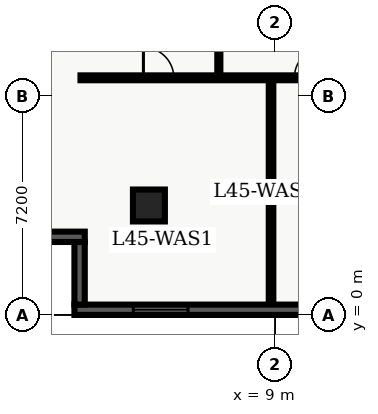
"""IFC4 building model, lengths in metres.
Left out: names, types, materials, properties, quantities, classifications, styles, units other than length and angle.
Written with IfcOpenShell. Run it as: python <this file> out.ifc"""

import sys

from ifc_helpers import new_model, entity, si_unit, converted_unit, direction, frame, origin_with_axes, origin_2d_with_axis, place, context, subcontext, project, spatial, polyline, rectangle, outline, extrude, element, fill, save


model = new_model("IFC4")
c1 = context("Model", 3, precision=1e-05, world=origin_with_axes(), true_north=direction((0.0, 1.0)))
c2 = subcontext(c1, "Body", "Model", "MODEL_VIEW")
j1 = project(units=[si_unit("LENGTHUNIT", "METRE"), converted_unit("PLANEANGLEUNIT", "DEGREE", entity("IfcPlaneAngleMeasure", 0.017), si_unit("PLANEANGLEUNIT", "RADIAN"), dimensions=[0, 0, 0, 0, 0, 0, 0])], contexts=[c1])
p1 = place(None, origin_with_axes())
s1 = spatial("IfcSite", under=j1, at=p1, CompositionType="ELEMENT")
p2 = place(p1, origin_with_axes())
s2 = spatial("IfcBuilding", under=s1, at=p2, CompositionType="ELEMENT")
p3 = place(p2, frame((0.0, 0.0, 183.6), z_axis=(0.0, 0.0, 1.0), x_axis=(1.0, 0.0, 0.0)))
s3 = spatial("IfcBuildingStorey", under=s2, at=p3, CompositionType="ELEMENT", Elevation=183.6)
p4 = place(p3, frame((4.85, 3.6, 0.0), z_axis=(0.0, 0.0, 1.0), x_axis=(1.0, 0.0, 0.0)))
e1 = element("IfcColumn", 1, at=p4, inside=s3, PredefinedType="COLUMN", context=c2, shape_type="SweptSolid", body=[
    extrude(rectangle(XDim=1.05, YDim=1.05, at=origin_2d_with_axis()), origin_with_axes(), (0.0, 0.0, 1.0), 3.9),
])
p5 = place(p3, frame((2.6, 7.8, 0.0), z_axis=(0.0, 0.0, 1.0), x_axis=(1.0, 0.0, 0.0)))
e2 = element("IfcWall", 2, at=p5, inside=s3, PredefinedType="PARTITIONING", context=c2, shape_type="SweptSolid", body=[
    extrude(outline(polyline([(0.0, -0.08), (18.55, -0.08), (18.55, 0.08), (0.0, 0.08), (0.0, -0.08)])), origin_with_axes(), (0.0, 0.0, 1.0), 2.64),
])
p6 = place(p5, frame((2.569, 0.0, 0.0), z_axis=(0.0, 0.0, 1.0), x_axis=(1.0, 0.0, 0.0)))
e3 = element("IfcOpeningElement", 3, at=p6, cuts=e2, PredefinedType="OPENING", context=c2, shape_type="SweptSolid", body=[
    extrude(rectangle(XDim=1.0, YDim=0.18, at=origin_2d_with_axis()), origin_with_axes(), (0.0, 0.0, 1.0), 2.15),
])
p7 = place(p5, frame((7.534, 0.0, 0.0), z_axis=(0.0, 0.0, 1.0), x_axis=(1.0, 0.0, 0.0)))
e4 = element("IfcOpeningElement", 4, at=p7, cuts=e2, PredefinedType="OPENING", context=c2, shape_type="SweptSolid", body=[
    extrude(rectangle(XDim=1.0, YDim=0.18, at=origin_2d_with_axis()), origin_with_axes(), (0.0, 0.0, 1.0), 2.15),
])
p8 = place(p5, frame((11.293, 0.0, 0.0), z_axis=(0.0, 0.0, 1.0), x_axis=(1.0, 0.0, 0.0)))
e5 = element("IfcOpeningElement", 5, at=p8, cuts=e2, PredefinedType="OPENING", context=c2, shape_type="SweptSolid", body=[
    extrude(rectangle(XDim=1.0, YDim=0.18, at=origin_2d_with_axis()), origin_with_axes(), (0.0, 0.0, 1.0), 2.15),
])
p9 = place(p5, frame((16.142, 0.0, 0.0), z_axis=(0.0, 0.0, 1.0), x_axis=(1.0, 0.0, 0.0)))
e6 = element("IfcOpeningElement", 6, at=p9, cuts=e2, PredefinedType="OPENING", context=c2, shape_type="SweptSolid", body=[
    extrude(rectangle(XDim=1.0, YDim=0.18, at=origin_2d_with_axis()), origin_with_axes(), (0.0, 0.0, 1.0), 2.15),
])
p10 = place(p3, frame((7.15, 7.8, 0.0), z_axis=(0.0, 0.0, 1.0), x_axis=(0.0, 1.0, 0.0)))
e7 = element("IfcWall", 7, at=p10, inside=s3, PredefinedType="PARTITIONING", context=c2, shape_type="SweptSolid", body=[
    extrude(outline(polyline([(0.0, -0.05), (32.7, -0.05), (32.7, 0.05), (0.0, 0.05), (0.0, -0.05)])), origin_with_axes(), (0.0, 0.0, 1.0), 2.64),
])
p11 = place(p10, frame((7.092, 0.0, 0.0), z_axis=(0.0, 0.0, 1.0), x_axis=(1.0, 0.0, 0.0)))
e8 = element("IfcOpeningElement", 8, at=p11, cuts=e7, PredefinedType="OPENING", context=c2, shape_type="SweptSolid", body=[
    extrude(rectangle(XDim=1.0, YDim=0.12, at=origin_2d_with_axis()), origin_with_axes(), (0.0, 0.0, 1.0), 2.15),
])
p12 = place(p10, frame((23.312, 0.0, 0.0), z_axis=(0.0, 0.0, 1.0), x_axis=(1.0, 0.0, 0.0)))
e9 = element("IfcOpeningElement", 9, at=p12, cuts=e7, PredefinedType="OPENING", context=c2, shape_type="SweptSolid", body=[
    extrude(rectangle(XDim=1.0, YDim=0.12, at=origin_2d_with_axis()), origin_with_axes(), (0.0, 0.0, 1.0), 2.15),
])
p13 = place(p3, frame((8.867, 0.335, 0.0), z_axis=(0.0, 0.0, 1.0), x_axis=(0.0, 1.0, 0.0)))
e10 = element("IfcWall", 10, at=p13, inside=s3, PredefinedType="PARTITIONING", context=c2, shape_type="SweptSolid", body=[
    extrude(outline(polyline([(0.0, -0.075), (7.365, -0.075), (7.365, 0.075), (0.0, 0.075), (0.0, -0.075)])), origin_with_axes(), (0.0, 0.0, 1.0), 2.64),
])
p14 = place(p3, frame((57.26, 0.17, 0.0), z_axis=(0.0, 0.0, 1.0), x_axis=(-1.0, 0.0, 0.0)))
e11 = element("IfcWall", 11, at=p14, inside=s3, PredefinedType="SOLIDWALL", context=c2, shape_type="SweptSolid", body=[
    extrude(outline(polyline([(0.0, -0.17), (54.86, -0.17), (54.86, 0.17), (0.0, 0.17), (0.0, -0.17)])), origin_with_axes(), (0.0, 0.0, 1.0), 3.6),
])
p15 = place(p14, frame((2.836, 0.0, 0.45), z_axis=(0.0, 0.0, 1.0), x_axis=(1.0, 0.0, 0.0)))
e12 = element("IfcOpeningElement", 12, at=p15, cuts=e11, PredefinedType="OPENING", context=c2, shape_type="SweptSolid", body=[
    extrude(rectangle(XDim=1.8, YDim=0.36, at=origin_2d_with_axis()), origin_with_axes(), (0.0, 0.0, 1.0), 2.1),
])
p16 = place(p14, frame((7.307, 0.0, 0.45), z_axis=(0.0, 0.0, 1.0), x_axis=(1.0, 0.0, 0.0)))
e13 = element("IfcOpeningElement", 13, at=p16, cuts=e11, PredefinedType="OPENING", context=c2, shape_type="SweptSolid", body=[
    extrude(rectangle(XDim=1.8, YDim=0.36, at=origin_2d_with_axis()), origin_with_axes(), (0.0, 0.0, 1.0), 2.1),
])
p17 = place(p14, frame((11.779, 0.0, 0.45), z_axis=(0.0, 0.0, 1.0), x_axis=(1.0, 0.0, 0.0)))
e14 = element("IfcOpeningElement", 14, at=p17, cuts=e11, PredefinedType="OPENING", context=c2, shape_type="SweptSolid", body=[
    extrude(rectangle(XDim=1.8, YDim=0.36, at=origin_2d_with_axis()), origin_with_axes(), (0.0, 0.0, 1.0), 2.1),
])
p18 = place(p14, frame((16.251, 0.0, 0.45), z_axis=(0.0, 0.0, 1.0), x_axis=(1.0, 0.0, 0.0)))
e15 = element("IfcOpeningElement", 15, at=p18, cuts=e11, PredefinedType="OPENING", context=c2, shape_type="SweptSolid", body=[
    extrude(rectangle(XDim=1.8, YDim=0.36, at=origin_2d_with_axis()), origin_with_axes(), (0.0, 0.0, 1.0), 2.1),
])
p19 = place(p14, frame((20.723, 0.0, 0.45), z_axis=(0.0, 0.0, 1.0), x_axis=(1.0, 0.0, 0.0)))
e16 = element("IfcOpeningElement", 16, at=p19, cuts=e11, PredefinedType="OPENING", context=c2, shape_type="SweptSolid", body=[
    extrude(rectangle(XDim=1.8, YDim=0.36, at=origin_2d_with_axis()), origin_with_axes(), (0.0, 0.0, 1.0), 2.1),
])
p20 = place(p14, frame((25.644, 0.0, 0.45), z_axis=(0.0, 0.0, 1.0), x_axis=(1.0, 0.0, 0.0)))
e17 = element("IfcOpeningElement", 17, at=p20, cuts=e11, PredefinedType="OPENING", context=c2, shape_type="SweptSolid", body=[
    extrude(rectangle(XDim=1.8, YDim=0.36, at=origin_2d_with_axis()), origin_with_axes(), (0.0, 0.0, 1.0), 2.1),
])
p21 = place(p14, frame((34.138, 0.0, 0.45), z_axis=(0.0, 0.0, 1.0), x_axis=(1.0, 0.0, 0.0)))
e18 = element("IfcOpeningElement", 18, at=p21, cuts=e11, PredefinedType="OPENING", context=c2, shape_type="SweptSolid", body=[
    extrude(rectangle(XDim=1.8, YDim=0.36, at=origin_2d_with_axis()), origin_with_axes(), (0.0, 0.0, 1.0), 2.1),
])
p22 = place(p14, frame((38.609, 0.0, 0.45), z_axis=(0.0, 0.0, 1.0), x_axis=(1.0, 0.0, 0.0)))
e19 = element("IfcOpeningElement", 19, at=p22, cuts=e11, PredefinedType="OPENING", context=c2, shape_type="SweptSolid", body=[
    extrude(rectangle(XDim=1.8, YDim=0.36, at=origin_2d_with_axis()), origin_with_axes(), (0.0, 0.0, 1.0), 2.1),
])
p23 = place(p14, frame((43.081, 0.0, 0.45), z_axis=(0.0, 0.0, 1.0), x_axis=(1.0, 0.0, 0.0)))
e20 = element("IfcOpeningElement", 20, at=p23, cuts=e11, PredefinedType="OPENING", context=c2, shape_type="SweptSolid", body=[
    extrude(rectangle(XDim=1.8, YDim=0.36, at=origin_2d_with_axis()), origin_with_axes(), (0.0, 0.0, 1.0), 2.1),
])
p24 = place(p14, frame((52.024, 0.0, 0.45), z_axis=(0.0, 0.0, 1.0), x_axis=(1.0, 0.0, 0.0)))
e21 = element("IfcOpeningElement", 21, at=p24, cuts=e11, PredefinedType="OPENING", context=c2, shape_type="SweptSolid", body=[
    extrude(rectangle(XDim=1.8, YDim=0.36, at=origin_2d_with_axis()), origin_with_axes(), (0.0, 0.0, 1.0), 2.1),
])
p25 = place(p3, frame((2.57, 0.34, 0.0), z_axis=(0.0, 0.0, 1.0), x_axis=(0.0, 1.0, 0.0)))
e22 = element("IfcWall", 22, at=p25, inside=s3, PredefinedType="SOLIDWALL", context=c2, shape_type="SweptSolid", body=[
    extrude(outline(polyline([(0.0, -0.17), (2.06, -0.17), (2.06, 0.17), (0.0, 0.17), (0.0, -0.17)])), origin_with_axes(), (0.0, 0.0, 1.0), 3.6),
])
p26 = place(p3, frame((2.74, 2.57, 0.0), z_axis=(0.0, 0.0, 1.0), x_axis=(-1.0, 0.0, 0.0)))
e23 = element("IfcWall", 23, at=p26, inside=s3, PredefinedType="SOLIDWALL", context=c2, shape_type="SweptSolid", body=[
    extrude(outline(polyline([(0.0, -0.17), (2.74, -0.17), (2.74, 0.17), (0.0, 0.17), (0.0, -0.17)])), origin_with_axes(), (0.0, 0.0, 1.0), 3.6),
])
p27 = place(p5, frame((2.569, 0.0, 0.0), z_axis=(0.0, 0.0, 1.0), x_axis=(1.0, 0.0, 0.0)))
e24 = element("IfcDoor", 24, at=p27, inside=s3, OperationType="SINGLE_SWING_LEFT", PredefinedType="DOOR", context=c2, shape_type="SweptSolid", body=[
    extrude(rectangle(XDim=1.0, YDim=0.09, at=origin_2d_with_axis()), origin_with_axes(), (0.0, 0.0, 1.0), 2.15),
])
fill(e3, e24)
p28 = place(p5, frame((7.534, 0.0, 0.0), z_axis=(0.0, 0.0, 1.0), x_axis=(1.0, 0.0, 0.0)))
e25 = element("IfcDoor", 25, at=p28, inside=s3, OperationType="SINGLE_SWING_RIGHT", PredefinedType="DOOR", context=c2, shape_type="SweptSolid", body=[
    extrude(rectangle(XDim=1.0, YDim=0.09, at=origin_2d_with_axis()), origin_with_axes(), (0.0, 0.0, 1.0), 2.15),
])
fill(e4, e25)
p29 = place(p14, frame((52.024, 0.0, 0.45), z_axis=(0.0, 0.0, 1.0), x_axis=(1.0, 0.0, 0.0)))
e26 = element("IfcWindow", 26, at=p29, inside=s3, PredefinedType="WINDOW", context=c2, shape_type="SweptSolid", body=[
    extrude(rectangle(XDim=1.8, YDim=0.09, at=origin_2d_with_axis()), origin_with_axes(), (0.0, 0.0, 1.0), 2.1),
])
fill(e21, e26)
save(model, sys.argv[1])
